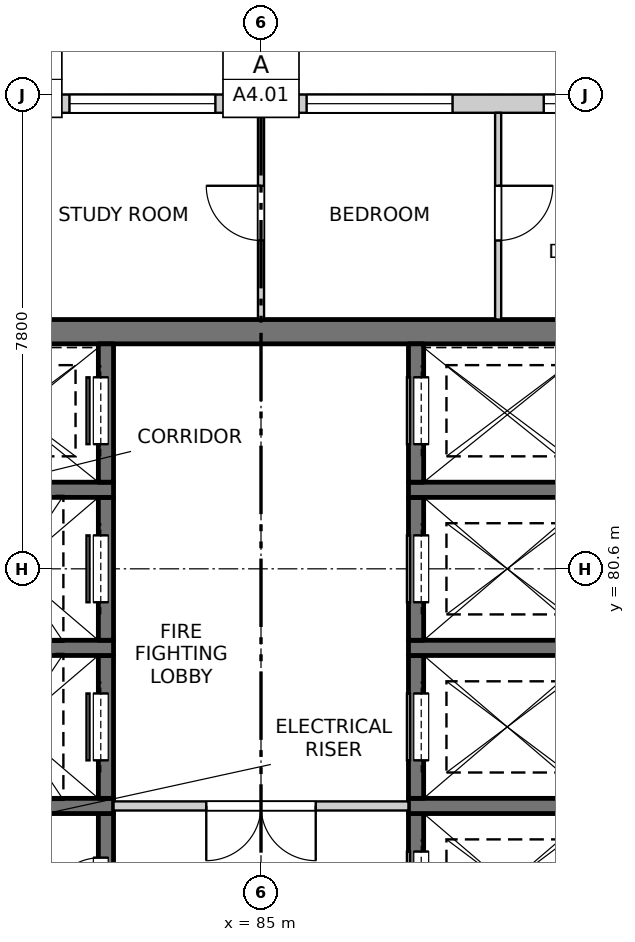
"""IFC4 building model, lengths in metres.
Left out: names, types, materials, properties, quantities, classifications, styles, units other than length and angle.
Written with IfcOpenShell. Run it as: python <this file> out.ifc"""

import sys

from ifc_helpers import new_model, si_unit, direction, frame, frame_2d, origin, place, context, subcontext, project, spatial, rectangle, extrude, element, fill, save


model = new_model("IFC4")
c1 = context("Model", 3, precision=1e-05, world=origin(), true_north=direction((0.0, 1.0)))
c2 = subcontext(c1, "Body", "Model", "MODEL_VIEW")
j1 = project(units=[si_unit("LENGTHUNIT", "METRE"), si_unit("PLANEANGLEUNIT", "RADIAN")], contexts=[c1])
p1 = place(None, origin())
s1 = spatial("IfcSite", under=j1, at=p1, CompositionType="ELEMENT")
p2 = place(p1, origin())
s2 = spatial("IfcBuilding", under=s1, at=p2, CompositionType="ELEMENT")
p3 = place(p2, frame((0.0, 0.0, 210.9)))
s3 = spatial("IfcBuildingStorey", under=s2, at=p3, CompositionType="ELEMENT", Elevation=210.9)
p4 = place(p3, frame((75.45, 84.5, -0.25), z_axis=(0.0, 0.0, 1.0), x_axis=(1.0, 0.0, 0.0)))
e1 = element("IfcWall", 1, at=p4, inside=s3, PredefinedType="SOLIDWALL", context=c2, shape_type="SweptSolid", body=[
    extrude(rectangle(XDim=19.1, YDim=0.4, at=frame_2d((9.55, 0.0))), origin(), (0.0, 0.0, 1.0), 3.4),
])
p5 = place(p3, frame((82.45, 74.225, -0.25), z_axis=(0.0, 0.0, 1.0), x_axis=(0.0, 1.0, 0.0)))
e2 = element("IfcWall", 2, at=p5, inside=s3, PredefinedType="SOLIDWALL", context=c2, shape_type="SweptSolid", body=[
    extrude(rectangle(XDim=2.35, YDim=0.25, at=frame_2d((1.175, 0.0))), origin(), (0.0, 0.0, 1.0), 3.4),
])
p6 = place(p5, frame((0.725, 0.0, 0.25)))
e3 = element("IfcOpeningElement", 3, at=p6, cuts=e2, PredefinedType="OPENING", context=c2, shape_type="SweptSolid", body=[
    extrude(rectangle(XDim=0.9, YDim=2.1, at=frame_2d((0.45, 1.05))), frame((0.0, 0.135, 0.0), z_axis=(0.0, -1.0, 0.0), x_axis=(1.0, 0.0, 0.0)), (0.0, 0.0, 1.0), 0.27),
])
p7 = place(p3, frame((79.575, 76.7, -0.25), z_axis=(0.0, 0.0, 1.0), x_axis=(1.0, 0.0, 0.0)))
e4 = element("IfcWall", 4, at=p7, inside=s3, PredefinedType="SOLIDWALL", context=c2, shape_type="SweptSolid", body=[
    extrude(rectangle(XDim=3.0, YDim=0.25, at=frame_2d((1.5, 0.0))), origin(), (0.0, 0.0, 1.0), 3.4),
])
p8 = place(p3, frame((82.45, 76.825, -0.25), z_axis=(0.0, 0.0, 1.0), x_axis=(0.0, 1.0, 0.0)))
e5 = element("IfcWall", 5, at=p8, inside=s3, PredefinedType="SOLIDWALL", context=c2, shape_type="SweptSolid", body=[
    extrude(rectangle(XDim=2.35, YDim=0.25, at=frame_2d((1.175, 0.0))), origin(), (0.0, 0.0, 1.0), 3.4),
])
p9 = place(p8, frame((0.625, 0.0, 0.25)))
e6 = element("IfcOpeningElement", 6, at=p9, cuts=e5, PredefinedType="OPENING", context=c2, shape_type="SweptSolid", body=[
    extrude(rectangle(XDim=1.1, YDim=2.1, at=frame_2d((0.55, 1.05))), frame((0.0, 0.135, 0.0), z_axis=(0.0, -1.0, 0.0), x_axis=(1.0, 0.0, 0.0)), (0.0, 0.0, 1.0), 0.27),
])
p10 = place(p3, frame((79.575, 79.3, -0.25), z_axis=(0.0, 0.0, 1.0), x_axis=(1.0, 0.0, 0.0)))
e7 = element("IfcWall", 7, at=p10, inside=s3, PredefinedType="SOLIDWALL", context=c2, shape_type="SweptSolid", body=[
    extrude(rectangle(XDim=3.0, YDim=0.25, at=frame_2d((1.5, 0.0))), origin(), (0.0, 0.0, 1.0), 3.4),
])
p11 = place(p3, frame((82.45, 79.425, -0.25), z_axis=(0.0, 0.0, 1.0), x_axis=(0.0, 1.0, 0.0)))
e8 = element("IfcWall", 8, at=p11, inside=s3, PredefinedType="SOLIDWALL", context=c2, shape_type="SweptSolid", body=[
    extrude(rectangle(XDim=2.35, YDim=0.25, at=frame_2d((1.175, 0.0))), origin(), (0.0, 0.0, 1.0), 3.4),
])
p12 = place(p11, frame((0.625, 0.0, 0.25)))
e9 = element("IfcOpeningElement", 9, at=p12, cuts=e8, PredefinedType="OPENING", context=c2, shape_type="SweptSolid", body=[
    extrude(rectangle(XDim=1.1, YDim=2.1, at=frame_2d((0.55, 1.05))), frame((0.0, 0.135, 0.0), z_axis=(0.0, -1.0, 0.0), x_axis=(1.0, 0.0, 0.0)), (0.0, 0.0, 1.0), 0.27),
])
p13 = place(p3, frame((79.575, 81.9, -0.25), z_axis=(0.0, 0.0, 1.0), x_axis=(1.0, 0.0, 0.0)))
e10 = element("IfcWall", 10, at=p13, inside=s3, PredefinedType="SOLIDWALL", context=c2, shape_type="SweptSolid", body=[
    extrude(rectangle(XDim=3.0, YDim=0.25, at=frame_2d((1.5, 0.0))), origin(), (0.0, 0.0, 1.0), 3.4),
])
p14 = place(p3, frame((82.45, 82.025, -0.25), z_axis=(0.0, 0.0, 1.0), x_axis=(0.0, 1.0, 0.0)))
e11 = element("IfcWall", 11, at=p14, inside=s3, PredefinedType="SOLIDWALL", context=c2, shape_type="SweptSolid", body=[
    extrude(rectangle(XDim=2.275, YDim=0.25, at=frame_2d((1.138, 0.0))), origin(), (0.0, 0.0, 1.0), 3.4),
])
p15 = place(p14, frame((0.625, 0.0, 0.25)))
e12 = element("IfcOpeningElement", 12, at=p15, cuts=e11, PredefinedType="OPENING", context=c2, shape_type="SweptSolid", body=[
    extrude(rectangle(XDim=1.1, YDim=2.1, at=frame_2d((0.55, 1.05))), frame((0.0, 0.135, 0.0), z_axis=(0.0, -1.0, 0.0), x_axis=(1.0, 0.0, 0.0)), (0.0, 0.0, 1.0), 0.27),
])
p16 = place(p3, frame((87.55, 74.225, -0.25), z_axis=(0.0, 0.0, 1.0), x_axis=(0.0, 1.0, 0.0)))
e13 = element("IfcWall", 13, at=p16, inside=s3, PredefinedType="SOLIDWALL", context=c2, shape_type="SweptSolid", body=[
    extrude(rectangle(XDim=2.35, YDim=0.25, at=frame_2d((1.175, 0.0))), origin(), (0.0, 0.0, 1.0), 3.4),
])
p17 = place(p16, frame((0.625, 0.0, 0.25)))
e14 = element("IfcOpeningElement", 14, at=p17, cuts=e13, PredefinedType="OPENING", context=c2, shape_type="SweptSolid", body=[
    extrude(rectangle(XDim=1.1, YDim=2.1, at=frame_2d((0.55, 1.05))), frame((0.0, 0.135, 0.0), z_axis=(0.0, -1.0, 0.0), x_axis=(1.0, 0.0, 0.0)), (0.0, 0.0, 1.0), 0.27),
])
p18 = place(p3, frame((87.425, 76.7, -0.25), z_axis=(0.0, 0.0, 1.0), x_axis=(1.0, 0.0, 0.0)))
e15 = element("IfcWall", 15, at=p18, inside=s3, PredefinedType="SOLIDWALL", context=c2, shape_type="SweptSolid", body=[
    extrude(rectangle(XDim=3.0, YDim=0.25, at=frame_2d((1.5, 0.0))), origin(), (0.0, 0.0, 1.0), 3.4),
])
p19 = place(p3, frame((87.55, 76.825, -0.25), z_axis=(0.0, 0.0, 1.0), x_axis=(0.0, 1.0, 0.0)))
e16 = element("IfcWall", 16, at=p19, inside=s3, PredefinedType="SOLIDWALL", context=c2, shape_type="SweptSolid", body=[
    extrude(rectangle(XDim=2.35, YDim=0.25, at=frame_2d((1.175, 0.0))), origin(), (0.0, 0.0, 1.0), 3.4),
])
p20 = place(p19, frame((0.625, 0.0, 0.25)))
e17 = element("IfcOpeningElement", 17, at=p20, cuts=e16, PredefinedType="OPENING", context=c2, shape_type="SweptSolid", body=[
    extrude(rectangle(XDim=1.1, YDim=2.1, at=frame_2d((0.55, 1.05))), frame((0.0, 0.135, 0.0), z_axis=(0.0, -1.0, 0.0), x_axis=(1.0, 0.0, 0.0)), (0.0, 0.0, 1.0), 0.27),
])
p21 = place(p3, frame((87.425, 79.3, -0.25), z_axis=(0.0, 0.0, 1.0), x_axis=(1.0, 0.0, 0.0)))
e18 = element("IfcWall", 18, at=p21, inside=s3, PredefinedType="SOLIDWALL", context=c2, shape_type="SweptSolid", body=[
    extrude(rectangle(XDim=3.0, YDim=0.25, at=frame_2d((1.5, 0.0))), origin(), (0.0, 0.0, 1.0), 3.4),
])
p22 = place(p3, frame((87.55, 79.425, -0.25), z_axis=(0.0, 0.0, 1.0), x_axis=(0.0, 1.0, 0.0)))
e19 = element("IfcWall", 19, at=p22, inside=s3, PredefinedType="SOLIDWALL", context=c2, shape_type="SweptSolid", body=[
    extrude(rectangle(XDim=2.35, YDim=0.25, at=frame_2d((1.175, 0.0))), origin(), (0.0, 0.0, 1.0), 3.4),
])
p23 = place(p22, frame((0.625, 0.0, 0.25)))
e20 = element("IfcOpeningElement", 20, at=p23, cuts=e19, PredefinedType="OPENING", context=c2, shape_type="SweptSolid", body=[
    extrude(rectangle(XDim=1.1, YDim=2.1, at=frame_2d((0.55, 1.05))), frame((0.0, 0.135, 0.0), z_axis=(0.0, -1.0, 0.0), x_axis=(1.0, 0.0, 0.0)), (0.0, 0.0, 1.0), 0.27),
])
p24 = place(p3, frame((87.425, 81.9, -0.25), z_axis=(0.0, 0.0, 1.0), x_axis=(1.0, 0.0, 0.0)))
e21 = element("IfcWall", 21, at=p24, inside=s3, PredefinedType="SOLIDWALL", context=c2, shape_type="SweptSolid", body=[
    extrude(rectangle(XDim=3.0, YDim=0.25, at=frame_2d((1.5, 0.0))), origin(), (0.0, 0.0, 1.0), 3.4),
])
p25 = place(p3, frame((87.55, 82.025, -0.25), z_axis=(0.0, 0.0, 1.0), x_axis=(0.0, 1.0, 0.0)))
e22 = element("IfcWall", 22, at=p25, inside=s3, PredefinedType="SOLIDWALL", context=c2, shape_type="SweptSolid", body=[
    extrude(rectangle(XDim=2.275, YDim=0.25, at=frame_2d((1.138, 0.0))), origin(), (0.0, 0.0, 1.0), 3.4),
])
p26 = place(p25, frame((0.625, 0.0, 0.25)))
e23 = element("IfcOpeningElement", 23, at=p26, cuts=e22, PredefinedType="OPENING", context=c2, shape_type="SweptSolid", body=[
    extrude(rectangle(XDim=1.1, YDim=2.1, at=frame_2d((0.55, 1.05))), frame((0.0, 0.135, 0.0), z_axis=(0.0, -1.0, 0.0), x_axis=(1.0, 0.0, 0.0)), (0.0, 0.0, 1.0), 0.27),
])
p27 = place(p3, frame((73.7, 88.25, 0.0), z_axis=(0.0, 0.0, 1.0), x_axis=(1.0, 0.0, 0.0)))
e24 = element("IfcWall", 24, at=p27, inside=s3, PredefinedType="SOLIDWALL", context=c2, shape_type="SweptSolid", body=[
    extrude(rectangle(XDim=22.6, YDim=0.3, at=frame_2d((11.3, 0.0))), origin(), (0.0, 0.0, 1.0), 2.7),
])
p28 = place(p27, frame((0.35, 0.0, 0.9)))
e25 = element("IfcOpeningElement", 25, at=p28, cuts=e24, PredefinedType="OPENING", context=c2, shape_type="SweptSolid", body=[
    extrude(rectangle(XDim=2.4, YDim=1.8, at=frame_2d((1.2, 0.9))), frame((0.0, 0.16, 0.0), z_axis=(0.0, -1.0, 0.0), x_axis=(1.0, 0.0, 0.0)), (0.0, 0.0, 1.0), 0.32),
])
p29 = place(p27, frame((4.25, 0.0, 0.9)))
e26 = element("IfcOpeningElement", 26, at=p29, cuts=e24, PredefinedType="OPENING", context=c2, shape_type="SweptSolid", body=[
    extrude(rectangle(XDim=2.4, YDim=1.8, at=frame_2d((1.2, 0.9))), frame((0.0, 0.16, 0.0), z_axis=(0.0, -1.0, 0.0), x_axis=(1.0, 0.0, 0.0)), (0.0, 0.0, 1.0), 0.32),
])
p30 = place(p27, frame((8.15, 0.0, 0.9)))
e27 = element("IfcOpeningElement", 27, at=p30, cuts=e24, PredefinedType="OPENING", context=c2, shape_type="SweptSolid", body=[
    extrude(rectangle(XDim=2.4, YDim=1.8, at=frame_2d((1.2, 0.9))), frame((0.0, 0.16, 0.0), z_axis=(0.0, -1.0, 0.0), x_axis=(1.0, 0.0, 0.0)), (0.0, 0.0, 1.0), 0.32),
])
p31 = place(p27, frame((12.05, 0.0, 0.9)))
e28 = element("IfcOpeningElement", 28, at=p31, cuts=e24, PredefinedType="OPENING", context=c2, shape_type="SweptSolid", body=[
    extrude(rectangle(XDim=2.4, YDim=1.8, at=frame_2d((1.2, 0.9))), frame((0.0, 0.16, 0.0), z_axis=(0.0, -1.0, 0.0), x_axis=(1.0, 0.0, 0.0)), (0.0, 0.0, 1.0), 0.32),
])
p32 = place(p27, frame((15.95, 0.0, 0.9)))
e29 = element("IfcOpeningElement", 29, at=p32, cuts=e24, PredefinedType="OPENING", context=c2, shape_type="SweptSolid", body=[
    extrude(rectangle(XDim=2.4, YDim=1.8, at=frame_2d((1.2, 0.9))), frame((0.0, 0.16, 0.0), z_axis=(0.0, -1.0, 0.0), x_axis=(1.0, 0.0, 0.0)), (0.0, 0.0, 1.0), 0.32),
])
p33 = place(p27, frame((19.85, 0.0, 0.9)))
e30 = element("IfcOpeningElement", 30, at=p33, cuts=e24, PredefinedType="OPENING", context=c2, shape_type="SweptSolid", body=[
    extrude(rectangle(XDim=2.4, YDim=1.8, at=frame_2d((1.2, 0.9))), frame((0.0, 0.16, 0.0), z_axis=(0.0, -1.0, 0.0), x_axis=(1.0, 0.0, 0.0)), (0.0, 0.0, 1.0), 0.32),
])
p34 = place(p3, frame((82.575, 76.7, 0.0), z_axis=(0.0, 0.0, 1.0), x_axis=(1.0, 0.0, 0.0)))
e31 = element("IfcWall", 31, at=p34, inside=s3, PredefinedType="PARTITIONING", context=c2, shape_type="SweptSolid", body=[
    extrude(rectangle(XDim=4.85, YDim=0.15, at=frame_2d((2.425, 0.0))), origin(), (0.0, 0.0, 1.0), 3.15),
])
p35 = place(p34, frame((1.525, 0.0, 0.0)))
e32 = element("IfcOpeningElement", 32, at=p35, cuts=e31, PredefinedType="OPENING", context=c2, shape_type="SweptSolid", body=[
    extrude(rectangle(XDim=1.8, YDim=2.1, at=frame_2d((0.9, 1.05))), frame((0.0, 0.085, 0.0), z_axis=(0.0, -1.0, 0.0), x_axis=(1.0, 0.0, 0.0)), (0.0, 0.0, 1.0), 0.17),
])
p36 = place(p3, frame((85.0, 84.7, 0.0), z_axis=(0.0, 0.0, 1.0), x_axis=(0.0, 1.0, 0.0)))
e33 = element("IfcWall", 33, at=p36, inside=s3, PredefinedType="PARTITIONING", context=c2, shape_type="SweptSolid", body=[
    extrude(rectangle(XDim=3.4, YDim=0.1, at=frame_2d((1.7, 0.0))), origin(), (0.0, 0.0, 1.0), 3.15),
])
p37 = place(p36, frame((1.3, 0.0, 0.0)))
e34 = element("IfcOpeningElement", 34, at=p37, cuts=e33, PredefinedType="OPENING", context=c2, shape_type="SweptSolid", body=[
    extrude(rectangle(XDim=0.9, YDim=2.1, at=frame_2d((0.45, 1.05))), frame((0.0, 0.06, 0.0), z_axis=(0.0, -1.0, 0.0), x_axis=(1.0, 0.0, 0.0)), (0.0, 0.0, 1.0), 0.12),
])
p38 = place(p3, frame((88.9, 84.7, 0.0), z_axis=(0.0, 0.0, 1.0), x_axis=(0.0, 1.0, 0.0)))
e35 = element("IfcWall", 35, at=p38, inside=s3, PredefinedType="PARTITIONING", context=c2, shape_type="SweptSolid", body=[
    extrude(rectangle(XDim=3.4, YDim=0.1, at=frame_2d((1.7, 0.0))), origin(), (0.0, 0.0, 1.0), 3.15),
])
p39 = place(p38, frame((1.3, 0.0, 0.0)))
e36 = element("IfcOpeningElement", 36, at=p39, cuts=e35, PredefinedType="OPENING", context=c2, shape_type="SweptSolid", body=[
    extrude(rectangle(XDim=0.9, YDim=2.1, at=frame_2d((0.45, 1.05))), frame((0.0, 0.06, 0.0), z_axis=(0.0, -1.0, 0.0), x_axis=(1.0, 0.0, 0.0)), (0.0, 0.0, 1.0), 0.12),
])
p40 = place(p30, origin())
e37 = element("IfcWindow", 37, at=p40, inside=s3, PartitioningType="DOUBLE_PANEL_VERTICAL", PredefinedType="WINDOW", context=c2, shape_type="SweptSolid", body=[
    extrude(rectangle(XDim=2.4, YDim=1.8, at=frame_2d((1.2, 0.9))), frame((0.0, 0.03, 0.0), z_axis=(0.0, -1.0, 0.0), x_axis=(1.0, 0.0, 0.0)), (0.0, 0.0, 1.0), 0.06),
])
fill(e27, e37)
p41 = place(p31, origin())
e38 = element("IfcWindow", 38, at=p41, inside=s3, PartitioningType="DOUBLE_PANEL_VERTICAL", PredefinedType="WINDOW", context=c2, shape_type="SweptSolid", body=[
    extrude(rectangle(XDim=2.4, YDim=1.8, at=frame_2d((1.2, 0.9))), frame((0.0, 0.03, 0.0), z_axis=(0.0, -1.0, 0.0), x_axis=(1.0, 0.0, 0.0)), (0.0, 0.0, 1.0), 0.06),
])
fill(e28, e38)
p42 = place(p32, origin())
e39 = element("IfcWindow", 39, at=p42, inside=s3, PartitioningType="DOUBLE_PANEL_VERTICAL", PredefinedType="WINDOW", context=c2, shape_type="SweptSolid", body=[
    extrude(rectangle(XDim=2.4, YDim=1.8, at=frame_2d((1.2, 0.9))), frame((0.0, 0.03, 0.0), z_axis=(0.0, -1.0, 0.0), x_axis=(1.0, 0.0, 0.0)), (0.0, 0.0, 1.0), 0.06),
])
fill(e29, e39)
p43 = place(p6, origin())
e40 = element("IfcDoor", 40, at=p43, inside=s3, OperationType="SINGLE_SWING_LEFT", PredefinedType="DOOR", context=c2, shape_type="SweptSolid", body=[
    extrude(rectangle(XDim=0.9, YDim=2.1, at=frame_2d((0.45, 1.05))), frame((0.0, 0.11, 0.0), z_axis=(0.0, -1.0, 0.0), x_axis=(1.0, 0.0, 0.0)), (0.0, 0.0, 1.0), 0.05),
])
fill(e3, e40)
p44 = place(p17, origin())
e41 = element("IfcDoor", 41, at=p44, inside=s3, OperationType="SLIDING_TO_LEFT", PredefinedType="DOOR", context=c2, shape_type="SweptSolid", body=[
    extrude(rectangle(XDim=1.1, YDim=2.1, at=frame_2d((0.55, 1.05))), frame((0.0, -0.06, 0.0), z_axis=(0.0, -1.0, 0.0), x_axis=(1.0, 0.0, 0.0)), (0.0, 0.0, 1.0), 0.05),
])
fill(e14, e41)
p45 = place(p35, origin())
e42 = element("IfcDoor", 42, at=p45, inside=s3, OperationType="DOUBLE_DOOR_SINGLE_SWING", PredefinedType="DOOR", context=c2, shape_type="SweptSolid", body=[
    extrude(rectangle(XDim=1.8, YDim=2.1, at=frame_2d((0.9, 1.05))), frame((0.0, 0.025, 0.0), z_axis=(0.0, -1.0, 0.0), x_axis=(1.0, 0.0, 0.0)), (0.0, 0.0, 1.0), 0.05),
])
fill(e32, e42)
p46 = place(p9, origin())
e43 = element("IfcDoor", 43, at=p46, inside=s3, OperationType="SLIDING_TO_LEFT", PredefinedType="DOOR", context=c2, shape_type="SweptSolid", body=[
    extrude(rectangle(XDim=1.1, YDim=2.1, at=frame_2d((0.55, 1.05))), frame((0.0, 0.11, 0.0), z_axis=(0.0, -1.0, 0.0), x_axis=(1.0, 0.0, 0.0)), (0.0, 0.0, 1.0), 0.05),
])
fill(e6, e43)
p47 = place(p20, origin())
e44 = element("IfcDoor", 44, at=p47, inside=s3, OperationType="SLIDING_TO_LEFT", PredefinedType="DOOR", context=c2, shape_type="SweptSolid", body=[
    extrude(rectangle(XDim=1.1, YDim=2.1, at=frame_2d((0.55, 1.05))), frame((0.0, -0.06, 0.0), z_axis=(0.0, -1.0, 0.0), x_axis=(1.0, 0.0, 0.0)), (0.0, 0.0, 1.0), 0.05),
])
fill(e17, e44)
p48 = place(p12, origin())
e45 = element("IfcDoor", 45, at=p48, inside=s3, OperationType="SLIDING_TO_LEFT", PredefinedType="DOOR", context=c2, shape_type="SweptSolid", body=[
    extrude(rectangle(XDim=1.1, YDim=2.1, at=frame_2d((0.55, 1.05))), frame((0.0, 0.11, 0.0), z_axis=(0.0, -1.0, 0.0), x_axis=(1.0, 0.0, 0.0)), (0.0, 0.0, 1.0), 0.05),
])
fill(e9, e45)
p49 = place(p23, origin())
e46 = element("IfcDoor", 46, at=p49, inside=s3, OperationType="SLIDING_TO_RIGHT", PredefinedType="DOOR", context=c2, shape_type="SweptSolid", body=[
    extrude(rectangle(XDim=1.1, YDim=2.1, at=frame_2d((0.55, 1.05))), frame((0.0, -0.06, 0.0), z_axis=(0.0, -1.0, 0.0), x_axis=(1.0, 0.0, 0.0)), (0.0, 0.0, 1.0), 0.05),
])
fill(e20, e46)
p50 = place(p15, origin())
e47 = element("IfcDoor", 47, at=p50, inside=s3, OperationType="SLIDING_TO_RIGHT", PredefinedType="DOOR", context=c2, shape_type="SweptSolid", body=[
    extrude(rectangle(XDim=1.1, YDim=2.1, at=frame_2d((0.55, 1.05))), frame((0.0, 0.11, 0.0), z_axis=(0.0, -1.0, 0.0), x_axis=(1.0, 0.0, 0.0)), (0.0, 0.0, 1.0), 0.05),
])
fill(e12, e47)
p51 = place(p26, origin())
e48 = element("IfcDoor", 48, at=p51, inside=s3, OperationType="SLIDING_TO_RIGHT", PredefinedType="DOOR", context=c2, shape_type="SweptSolid", body=[
    extrude(rectangle(XDim=1.1, YDim=2.1, at=frame_2d((0.55, 1.05))), frame((0.0, -0.06, 0.0), z_axis=(0.0, -1.0, 0.0), x_axis=(1.0, 0.0, 0.0)), (0.0, 0.0, 1.0), 0.05),
])
fill(e23, e48)
p52 = place(p37, origin())
e49 = element("IfcDoor", 49, at=p52, inside=s3, OperationType="SINGLE_SWING_RIGHT", PredefinedType="DOOR", context=c2, shape_type="SweptSolid", body=[
    extrude(rectangle(XDim=0.9, YDim=2.1, at=frame_2d((0.45, 1.05))), frame((0.0, 0.025, 0.0), z_axis=(0.0, -1.0, 0.0), x_axis=(1.0, 0.0, 0.0)), (0.0, 0.0, 1.0), 0.05),
])
fill(e34, e49)
p53 = place(p39, origin())
e50 = element("IfcDoor", 50, at=p53, inside=s3, OperationType="SINGLE_SWING_LEFT", PredefinedType="DOOR", context=c2, shape_type="SweptSolid", body=[
    extrude(rectangle(XDim=0.9, YDim=2.1, at=frame_2d((0.45, 1.05))), frame((0.0, 0.025, 0.0), z_axis=(0.0, -1.0, 0.0), x_axis=(1.0, 0.0, 0.0)), (0.0, 0.0, 1.0), 0.05),
])
fill(e36, e50)
save(model, sys.argv[1])
